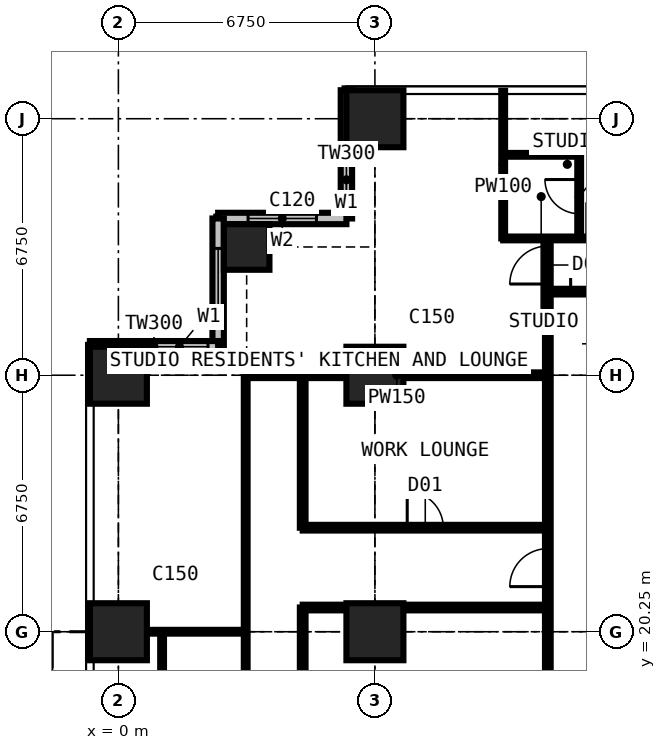
"""IFC4 building model, lengths in metres.
Left out: names, types, materials, properties, quantities, classifications, styles, units other than length and angle.
Written with IfcOpenShell. Run it as: python <this file> out.ifc"""

import sys

from ifc_helpers import new_model, si_unit, direction, frame, frame_2d, origin, origin_2d, place, context, subcontext, project, spatial, rectangle, extrude, element, fill, save


model = new_model("IFC4")
c1 = context("Model", 3, precision=1e-05, world=origin(), true_north=direction((0.0, 1.0)))
c2 = subcontext(c1, "Body", "Model", "MODEL_VIEW")
j1 = project(units=[si_unit("LENGTHUNIT", "METRE"), si_unit("PLANEANGLEUNIT", "RADIAN")], contexts=[c1])
p1 = place(None, origin())
s1 = spatial("IfcSite", under=j1, at=p1, CompositionType="ELEMENT")
p2 = place(p1, origin())
s2 = spatial("IfcBuilding", under=s1, at=p2, CompositionType="ELEMENT")
p3 = place(p2, frame((0.0, 0.0, 167.4)))
s3 = spatial("IfcBuildingStorey", under=s2, at=p3, CompositionType="ELEMENT", Elevation=167.4)
for number, where, z_axis, x_axis in (
    (1, (0.0, 20.25, 0.0), (0.0, 0.0, 1.0), (1.0, 0.0, 0.0)),
    (2, (0.0, 27.0, 0.0), (0.0, 0.0, 1.0), (1.0, 0.0, 0.0)),
):
    element("IfcColumn", number, at=place(p3, frame(where, z_axis=z_axis, x_axis=x_axis)), inside=s3, PredefinedType="COLUMN", context=c2, shape_type="SweptSolid", body=[
        extrude(rectangle(XDim=1.5, YDim=1.5, at=origin_2d()), origin(), (0.0, 0.0, 1.0), 3.6),
    ])
p4 = place(p3, frame((3.375, 30.375, 0.0), z_axis=(0.0, 0.0, 1.0), x_axis=(1.0, 0.0, 0.0)))
e3 = element("IfcColumn", 3, at=p4, inside=s3, PredefinedType="COLUMN", context=c2, shape_type="SweptSolid", body=[
    extrude(rectangle(XDim=1.2, YDim=1.2, at=origin_2d()), origin(), (0.0, 0.0, 1.0), 3.6),
])
for number, where, z_axis, x_axis in (
    (4, (6.75, 20.25, 0.0), (0.0, 0.0, 1.0), (1.0, 0.0, 0.0)),
    (5, (6.75, 27.0, 0.0), (0.0, 0.0, 1.0), (1.0, 0.0, 0.0)),
    (6, (6.75, 33.75, 0.0), (0.0, 0.0, 1.0), (1.0, 0.0, 0.0)),
):
    element("IfcColumn", number, at=place(p3, frame(where, z_axis=z_axis, x_axis=x_axis)), inside=s3, PredefinedType="COLUMN", context=c2, shape_type="SweptSolid", body=[
        extrude(rectangle(XDim=1.5, YDim=1.5, at=origin_2d()), origin(), (0.0, 0.0, 1.0), 3.6),
    ])
p5 = place(p3, frame((6.0, 34.5, 0.0), z_axis=(0.0, 0.0, 1.0), x_axis=(0.0, -1.0, 0.0)))
e7 = element("IfcWall", 7, at=p5, inside=s3, PredefinedType="SOLIDWALL", context=c2, shape_type="SweptSolid", body=[
    extrude(rectangle(XDim=3.375, YDim=0.3, at=frame_2d((1.688, 0.0))), origin(), (0.0, 0.0, 1.0), 3.375),
])
p6 = place(p5, frame((1.607, 0.0, 0.9)))
e8 = element("IfcOpeningElement", 8, at=p6, cuts=e7, PredefinedType="OPENING", context=c2, shape_type="SweptSolid", body=[
    extrude(rectangle(XDim=1.5, YDim=1.8, at=frame_2d((0.75, 0.9))), frame((0.0, 0.16, 0.0), z_axis=(0.0, -1.0, 0.0), x_axis=(1.0, 0.0, 0.0)), (0.0, 0.0, 1.0), 0.32),
])
p7 = place(p3, frame((6.0, 31.125, 0.0), z_axis=(0.0, 0.0, 1.0), x_axis=(-1.0, 0.0, 0.0)))
e9 = element("IfcWall", 9, at=p7, inside=s3, PredefinedType="SOLIDWALL", context=c2, shape_type="SweptSolid", body=[
    extrude(rectangle(XDim=3.375, YDim=0.3, at=frame_2d((1.688, 0.0))), origin(), (0.0, 0.0, 1.0), 3.375),
])
p8 = place(p7, frame((0.788, 0.0, 0.6)))
e10 = element("IfcOpeningElement", 10, at=p8, cuts=e9, PredefinedType="OPENING", context=c2, shape_type="SweptSolid", body=[
    extrude(rectangle(XDim=1.8, YDim=2.1, at=frame_2d((0.9, 1.05))), frame((0.0, 0.16, 0.0), z_axis=(0.0, -1.0, 0.0), x_axis=(1.0, 0.0, 0.0)), (0.0, 0.0, 1.0), 0.32),
])
p9 = place(p3, frame((2.625, 31.125, 0.0), z_axis=(0.0, 0.0, 1.0), x_axis=(0.0, -1.0, 0.0)))
e11 = element("IfcWall", 11, at=p9, inside=s3, PredefinedType="SOLIDWALL", context=c2, shape_type="SweptSolid", body=[
    extrude(rectangle(XDim=3.375, YDim=0.3, at=frame_2d((1.688, 0.0))), origin(), (0.0, 0.0, 1.0), 3.375),
])
p10 = place(p9, frame((0.788, 0.0, 0.6)))
e12 = element("IfcOpeningElement", 12, at=p10, cuts=e11, PredefinedType="OPENING", context=c2, shape_type="SweptSolid", body=[
    extrude(rectangle(XDim=1.8, YDim=2.1, at=frame_2d((0.9, 1.05))), frame((0.0, 0.16, 0.0), z_axis=(0.0, -1.0, 0.0), x_axis=(1.0, 0.0, 0.0)), (0.0, 0.0, 1.0), 0.32),
])
p11 = place(p3, frame((2.625, 27.75, 0.0), z_axis=(0.0, 0.0, 1.0), x_axis=(-1.0, 0.0, 0.0)))
e13 = element("IfcWall", 13, at=p11, inside=s3, PredefinedType="SOLIDWALL", context=c2, shape_type="SweptSolid", body=[
    extrude(rectangle(XDim=3.375, YDim=0.3, at=frame_2d((1.688, 0.0))), origin(), (0.0, 0.0, 1.0), 3.375),
])
p12 = place(p11, frame((0.268, 0.0, 0.9)))
e14 = element("IfcOpeningElement", 14, at=p12, cuts=e13, PredefinedType="OPENING", context=c2, shape_type="SweptSolid", body=[
    extrude(rectangle(XDim=1.5, YDim=1.8, at=frame_2d((0.75, 0.9))), frame((0.0, 0.16, 0.0), z_axis=(0.0, -1.0, 0.0), x_axis=(1.0, 0.0, 0.0)), (0.0, 0.0, 1.0), 0.32),
])
p13 = place(p3, frame((-0.734, 20.25, 0.0), z_axis=(0.0, 0.0, 1.0), x_axis=(1.0, 0.0, 0.0)))
e15 = element("IfcWall", 15, at=p13, inside=s3, PredefinedType="PARTITIONING", context=c2, shape_type="SweptSolid", body=[
    extrude(rectangle(XDim=4.084, YDim=0.1, at=frame_2d((2.042, 0.0))), origin(), (0.0, 0.0, 1.0), 2.61),
])
p14 = place(p3, frame((1.15, 18.25, 0.0), z_axis=(0.0, 0.0, 1.0), x_axis=(0.0, 1.0, 0.0)))
e16 = element("IfcWall", 16, at=p14, inside=s3, PredefinedType="PARTITIONING", context=c2, shape_type="SweptSolid", body=[
    extrude(rectangle(XDim=2.0, YDim=0.1, at=frame_2d((1.0, 0.0))), origin(), (0.0, 0.0, 1.0), 3.375),
])
p15 = place(p3, frame((3.35, 10.125, 0.0), z_axis=(0.0, 0.0, 1.0), x_axis=(0.0, 1.0, 0.0)))
e17 = element("IfcWall", 17, at=p15, inside=s3, PredefinedType="PARTITIONING", context=c2, shape_type="SweptSolid", body=[
    extrude(rectangle(XDim=16.875, YDim=0.1, at=frame_2d((8.438, 0.0))), origin(), (0.0, 0.0, 1.0), 3.375),
])
p16 = place(p15, frame((0.2, 0.0, 0.0)))
e18 = element("IfcOpeningElement", 18, at=p16, cuts=e17, PredefinedType="OPENING", context=c2, shape_type="SweptSolid", body=[
    extrude(rectangle(XDim=0.95, YDim=2.2, at=frame_2d((0.475, 1.1))), frame((0.0, 0.06, 0.0), z_axis=(0.0, -1.0, 0.0), x_axis=(1.0, 0.0, 0.0)), (0.0, 0.0, 1.0), 0.12),
])
p17 = place(p15, frame((3.575, 0.0, 0.0)))
e19 = element("IfcOpeningElement", 19, at=p17, cuts=e17, PredefinedType="OPENING", context=c2, shape_type="SweptSolid", body=[
    extrude(rectangle(XDim=0.95, YDim=2.2, at=frame_2d((0.475, 1.1))), frame((0.0, 0.06, 0.0), z_axis=(0.0, -1.0, 0.0), x_axis=(1.0, 0.0, 0.0)), (0.0, 0.0, 1.0), 0.12),
])
p18 = place(p15, frame((6.95, 0.0, 0.0)))
e20 = element("IfcOpeningElement", 20, at=p18, cuts=e17, PredefinedType="OPENING", context=c2, shape_type="SweptSolid", body=[
    extrude(rectangle(XDim=0.95, YDim=2.2, at=frame_2d((0.475, 1.1))), frame((0.0, 0.06, 0.0), z_axis=(0.0, -1.0, 0.0), x_axis=(1.0, 0.0, 0.0)), (0.0, 0.0, 1.0), 0.12),
])
p19 = place(p3, frame((3.35, 27.0, 0.0), z_axis=(0.0, 0.0, 1.0), x_axis=(1.0, 0.0, 0.0)))
e21 = element("IfcWall", 21, at=p19, inside=s3, PredefinedType="PARTITIONING", context=c2, shape_type="SweptSolid", body=[
    extrude(rectangle(XDim=7.95, YDim=0.15, at=frame_2d((3.975, 0.0))), origin(), (0.0, 0.0, 1.0), 2.806),
])
p20 = place(p3, frame((4.85, 12.775, 0.0), z_axis=(0.0, 0.0, 1.0), x_axis=(0.0, 1.0, 0.0)))
e22 = element("IfcWall", 22, at=p20, inside=s3, PredefinedType="PARTITIONING", context=c2, shape_type="SweptSolid", body=[
    extrude(rectangle(XDim=8.113, YDim=0.15, at=frame_2d((4.056, 0.0))), origin(), (0.0, 0.0, 1.0), 3.375),
])
p21 = place(p20, frame((3.6, 0.0, 0.0)))
e23 = element("IfcOpeningElement", 23, at=p21, cuts=e22, PredefinedType="OPENING", context=c2, shape_type="SweptSolid", body=[
    extrude(rectangle(XDim=0.95, YDim=2.2, at=frame_2d((0.475, 1.1))), frame((0.0, 0.085, 0.0), z_axis=(0.0, -1.0, 0.0), x_axis=(1.0, 0.0, 0.0)), (0.0, 0.0, 1.0), 0.17),
])
p22 = place(p3, frame((4.85, 20.887, 0.0), z_axis=(0.0, 0.0, 1.0), x_axis=(1.0, 0.0, 0.0)))
e24 = element("IfcWall", 24, at=p22, inside=s3, PredefinedType="PARTITIONING", context=c2, shape_type="SweptSolid", body=[
    extrude(rectangle(XDim=6.45, YDim=0.15, at=frame_2d((3.225, 0.0))), origin(), (0.0, 0.0, 1.0), 3.375),
])
p23 = place(p3, frame((4.85, 22.988, 0.0), z_axis=(0.0, 0.0, 1.0), x_axis=(0.0, 1.0, 0.0)))
e25 = element("IfcWall", 25, at=p23, inside=s3, PredefinedType="PARTITIONING", context=c2, shape_type="SweptSolid", body=[
    extrude(rectangle(XDim=4.012, YDim=0.15, at=frame_2d((2.006, 0.0))), origin(), (0.0, 0.0, 1.0), 3.375),
])
p24 = place(p3, frame((4.85, 22.988, 0.0), z_axis=(0.0, 0.0, 1.0), x_axis=(1.0, 0.0, 0.0)))
e26 = element("IfcWall", 26, at=p24, inside=s3, PredefinedType="PARTITIONING", context=c2, shape_type="SweptSolid", body=[
    extrude(rectangle(XDim=6.45, YDim=0.15, at=frame_2d((3.225, 0.0))), origin(), (0.0, 0.0, 1.0), 3.375),
])
p25 = place(p24, frame((2.75, 0.0, 0.0)))
e27 = element("IfcOpeningElement", 27, at=p25, cuts=e26, PredefinedType="OPENING", context=c2, shape_type="SweptSolid", body=[
    extrude(rectangle(XDim=0.95, YDim=2.2, at=frame_2d((0.475, 1.1))), frame((0.0, 0.085, 0.0), z_axis=(0.0, -1.0, 0.0), x_axis=(1.0, 0.0, 0.0)), (0.0, 0.0, 1.0), 0.17),
])
p26 = place(p3, frame((10.125, 30.6, 0.0), z_axis=(0.0, 0.0, 1.0), x_axis=(0.0, 1.0, 0.0)))
e28 = element("IfcWall", 28, at=p26, inside=s3, PredefinedType="PARTITIONING", context=c2, shape_type="SweptSolid", body=[
    extrude(rectangle(XDim=3.884, YDim=0.1, at=frame_2d((1.942, 0.0))), origin(), (0.0, 0.0, 1.0), 3.375),
])
p27 = place(p3, frame((10.125, 30.6, 0.0), z_axis=(0.0, 0.0, 1.0), x_axis=(1.0, 0.0, 0.0)))
e29 = element("IfcWall", 29, at=p27, inside=s3, PredefinedType="PARTITIONING", context=c2, shape_type="SweptSolid", body=[
    extrude(rectangle(XDim=3.375, YDim=0.1, at=frame_2d((1.688, 0.0))), origin(), (0.0, 0.0, 1.0), 3.375),
])
p28 = place(p27, frame((2.2, 0.0, 0.0)))
e30 = element("IfcOpeningElement", 30, at=p28, cuts=e29, PredefinedType="OPENING", context=c2, shape_type="SweptSolid", body=[
    extrude(rectangle(XDim=0.95, YDim=2.2, at=frame_2d((0.475, 1.1))), frame((0.0, 0.06, 0.0), z_axis=(0.0, -1.0, 0.0), x_axis=(1.0, 0.0, 0.0)), (0.0, 0.0, 1.0), 0.12),
])
p29 = place(p3, frame((10.125, 32.8, 0.0), z_axis=(0.0, 0.0, 1.0), x_axis=(1.0, 0.0, 0.0)))
e31 = element("IfcWall", 31, at=p29, inside=s3, PredefinedType="PARTITIONING", context=c2, shape_type="SweptSolid", body=[
    extrude(rectangle(XDim=2.0, YDim=0.1, at=frame_2d((1.0, 0.0))), origin(), (0.0, 0.0, 1.0), 3.375),
])
p30 = place(p3, frame((11.3, 11.3, 0.0), z_axis=(0.0, 0.0, 1.0), x_axis=(0.0, 1.0, 0.0)))
e32 = element("IfcWall", 32, at=p30, inside=s3, PredefinedType="PARTITIONING", context=c2, shape_type="SweptSolid", body=[
    extrude(rectangle(XDim=19.3, YDim=0.15, at=frame_2d((9.65, 0.0))), origin(), (0.0, 0.0, 1.0), 3.375),
])
p31 = place(p30, frame((18.1, 0.0, 0.0)))
e33 = element("IfcOpeningElement", 33, at=p31, cuts=e32, PredefinedType="OPENING", context=c2, shape_type="SweptSolid", body=[
    extrude(rectangle(XDim=1.0, YDim=2.2, at=frame_2d((0.5, 1.1))), frame((0.0, 0.085, 0.0), z_axis=(0.0, -1.0, 0.0), x_axis=(1.0, 0.0, 0.0)), (0.0, 0.0, 1.0), 0.17),
])
p32 = place(p30, frame((10.137, 0.0, 0.0)))
e34 = element("IfcOpeningElement", 34, at=p32, cuts=e32, PredefinedType="OPENING", context=c2, shape_type="SweptSolid", body=[
    extrude(rectangle(XDim=1.0, YDim=2.2, at=frame_2d((0.5, 1.1))), frame((0.0, 0.085, 0.0), z_axis=(0.0, -1.0, 0.0), x_axis=(1.0, 0.0, 0.0)), (0.0, 0.0, 1.0), 0.17),
])
p33 = place(p3, frame((11.3, 29.2, 0.0), z_axis=(0.0, 0.0, 1.0), x_axis=(1.0, 0.0, 0.0)))
e35 = element("IfcWall", 35, at=p33, inside=s3, PredefinedType="PARTITIONING", context=c2, shape_type="SweptSolid", body=[
    extrude(rectangle(XDim=19.809, YDim=0.15, at=frame_2d((9.904, 0.0))), origin(), (0.0, 0.0, 1.0), 3.375),
])
p34 = place(p33, frame((12.9, 0.0, 0.0)))
e36 = element("IfcOpeningElement", 36, at=p34, cuts=e35, PredefinedType="OPENING", context=c2, shape_type="SweptSolid", body=[
    extrude(rectangle(XDim=1.0, YDim=2.2, at=frame_2d((0.5, 1.1))), frame((0.0, 0.085, 0.0), z_axis=(0.0, -1.0, 0.0), x_axis=(1.0, 0.0, 0.0)), (0.0, 0.0, 1.0), 0.17),
])
p35 = place(p33, frame((5.825, 0.0, 0.0)))
e37 = element("IfcOpeningElement", 37, at=p35, cuts=e35, PredefinedType="OPENING", context=c2, shape_type="SweptSolid", body=[
    extrude(rectangle(XDim=0.95, YDim=2.2, at=frame_2d((0.475, 1.1))), frame((0.0, 0.085, 0.0), z_axis=(0.0, -1.0, 0.0), x_axis=(1.0, 0.0, 0.0)), (0.0, 0.0, 1.0), 0.17),
])
p36 = place(p33, frame((0.6, 0.0, 0.0)))
e38 = element("IfcOpeningElement", 38, at=p36, cuts=e35, PredefinedType="OPENING", context=c2, shape_type="SweptSolid", body=[
    extrude(rectangle(XDim=1.0, YDim=2.2, at=frame_2d((0.5, 1.1))), frame((0.0, 0.085, 0.0), z_axis=(0.0, -1.0, 0.0), x_axis=(1.0, 0.0, 0.0)), (0.0, 0.0, 1.0), 0.17),
])
p37 = place(p3, frame((12.125, 30.6, 0.0), z_axis=(0.0, 0.0, 1.0), x_axis=(0.0, 1.0, 0.0)))
e39 = element("IfcWall", 39, at=p37, inside=s3, PredefinedType="PARTITIONING", context=c2, shape_type="SweptSolid", body=[
    extrude(rectangle(XDim=2.2, YDim=0.1, at=frame_2d((1.1, 0.0))), origin(), (0.0, 0.0, 1.0), 3.375),
])
p38 = place(p37, frame((0.65, 0.0, 0.0)))
e40 = element("IfcOpeningElement", 40, at=p38, cuts=e39, PredefinedType="OPENING", context=c2, shape_type="SweptSolid", body=[
    extrude(rectangle(XDim=0.9, YDim=2.2, at=frame_2d((0.45, 1.1))), frame((0.0, 0.06, 0.0), z_axis=(0.0, -1.0, 0.0), x_axis=(1.0, 0.0, 0.0)), (0.0, 0.0, 1.0), 0.12),
])
p39 = place(p6, origin())
e41 = element("IfcWindow", 41, at=p39, inside=s3, PartitioningType="SINGLE_PANEL", PredefinedType="WINDOW", context=c2, shape_type="SweptSolid", body=[
    extrude(rectangle(XDim=1.5, YDim=1.8, at=frame_2d((0.75, 0.9))), frame((0.0, 0.03, 0.0), z_axis=(0.0, -1.0, 0.0), x_axis=(1.0, 0.0, 0.0)), (0.0, 0.0, 1.0), 0.06),
])
fill(e8, e41)
p40 = place(p8, origin())
e42 = element("IfcWindow", 42, at=p40, inside=s3, PartitioningType="SINGLE_PANEL", PredefinedType="WINDOW", context=c2, shape_type="SweptSolid", body=[
    extrude(rectangle(XDim=1.8, YDim=2.1, at=frame_2d((0.9, 1.05))), frame((0.0, 0.03, 0.0), z_axis=(0.0, -1.0, 0.0), x_axis=(1.0, 0.0, 0.0)), (0.0, 0.0, 1.0), 0.06),
])
fill(e10, e42)
p41 = place(p10, origin())
e43 = element("IfcWindow", 43, at=p41, inside=s3, PartitioningType="SINGLE_PANEL", PredefinedType="WINDOW", context=c2, shape_type="SweptSolid", body=[
    extrude(rectangle(XDim=1.8, YDim=2.1, at=frame_2d((0.9, 1.05))), frame((0.0, 0.03, 0.0), z_axis=(0.0, -1.0, 0.0), x_axis=(1.0, 0.0, 0.0)), (0.0, 0.0, 1.0), 0.06),
])
fill(e12, e43)
p42 = place(p12, origin())
e44 = element("IfcWindow", 44, at=p42, inside=s3, PartitioningType="SINGLE_PANEL", PredefinedType="WINDOW", context=c2, shape_type="SweptSolid", body=[
    extrude(rectangle(XDim=1.5, YDim=1.8, at=frame_2d((0.75, 0.9))), frame((0.0, 0.03, 0.0), z_axis=(0.0, -1.0, 0.0), x_axis=(1.0, 0.0, 0.0)), (0.0, 0.0, 1.0), 0.06),
])
fill(e14, e44)
p43 = place(p38, origin())
e45 = element("IfcDoor", 45, at=p43, inside=s3, OperationType="SINGLE_SWING_RIGHT", PredefinedType="DOOR", context=c2, shape_type="SweptSolid", body=[
    extrude(rectangle(XDim=0.9, YDim=2.2, at=frame_2d((0.45, 1.1))), frame((0.0, 0.025, 0.0), z_axis=(0.0, -1.0, 0.0), x_axis=(1.0, 0.0, 0.0)), (0.0, 0.0, 1.0), 0.05),
])
fill(e40, e45)
p44 = place(p36, origin())
e46 = element("IfcDoor", 46, at=p44, inside=s3, OperationType="SINGLE_SWING_LEFT", PredefinedType="DOOR", context=c2, shape_type="SweptSolid", body=[
    extrude(rectangle(XDim=1.0, YDim=2.2, at=frame_2d((0.5, 1.1))), frame((0.0, 0.025, 0.0), z_axis=(0.0, -1.0, 0.0), x_axis=(1.0, 0.0, 0.0)), (0.0, 0.0, 1.0), 0.05),
])
fill(e38, e46)
p45 = place(p31, origin())
e47 = element("IfcDoor", 47, at=p45, inside=s3, OperationType="SINGLE_SWING_LEFT", PredefinedType="DOOR", context=c2, shape_type="SweptSolid", body=[
    extrude(rectangle(XDim=1.0, YDim=2.2, at=frame_2d((0.5, 1.1))), frame((0.0, 0.025, 0.0), z_axis=(0.0, -1.0, 0.0), x_axis=(1.0, 0.0, 0.0)), (0.0, 0.0, 1.0), 0.05),
])
fill(e33, e47)
p46 = place(p32, origin())
e48 = element("IfcDoor", 48, at=p46, inside=s3, OperationType="SINGLE_SWING_LEFT", PredefinedType="DOOR", context=c2, shape_type="SweptSolid", body=[
    extrude(rectangle(XDim=1.0, YDim=2.2, at=frame_2d((0.5, 1.1))), frame((0.0, 0.025, 0.0), z_axis=(0.0, -1.0, 0.0), x_axis=(1.0, 0.0, 0.0)), (0.0, 0.0, 1.0), 0.05),
])
fill(e34, e48)
p47 = place(p25, origin())
e49 = element("IfcDoor", 49, at=p47, inside=s3, OperationType="SINGLE_SWING_LEFT", PredefinedType="DOOR", context=c2, shape_type="SweptSolid", body=[
    extrude(rectangle(XDim=0.95, YDim=2.2, at=frame_2d((0.475, 1.1))), frame((0.0, 0.025, 0.0), z_axis=(0.0, -1.0, 0.0), x_axis=(1.0, 0.0, 0.0)), (0.0, 0.0, 1.0), 0.05),
])
fill(e27, e49)
save(model, sys.argv[1])
